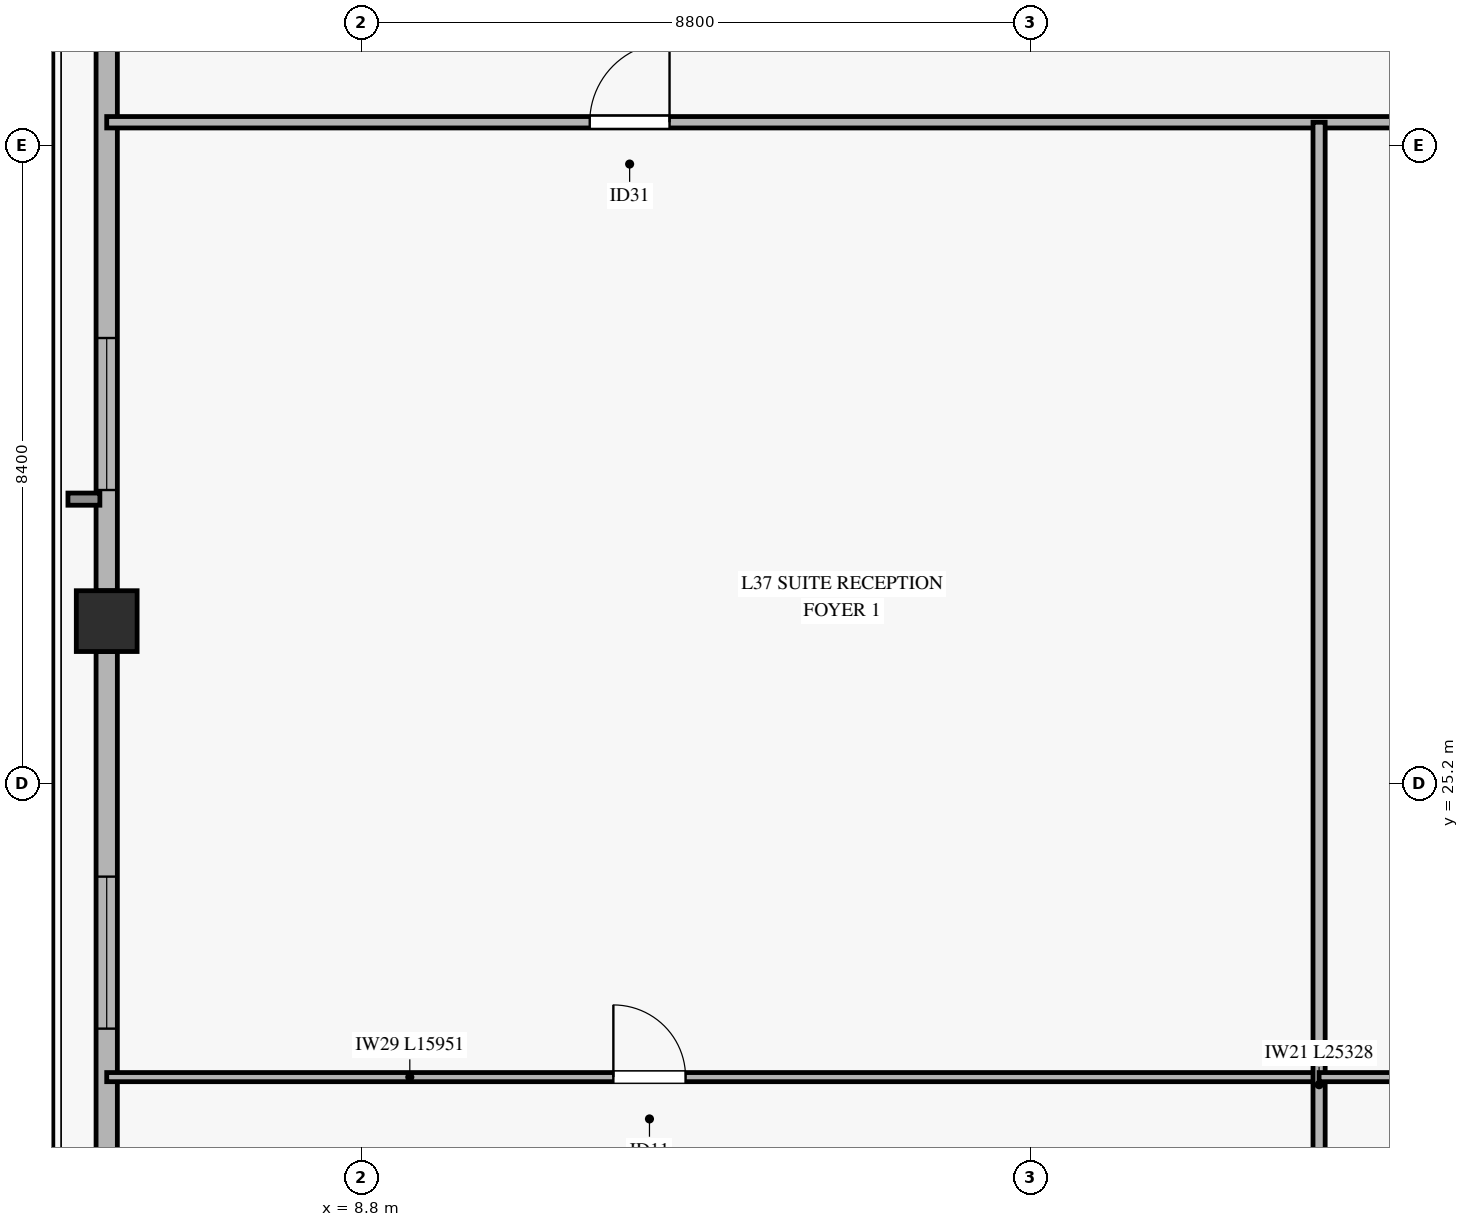
"""IFC4 building model, lengths in metres.
Left out: names, types, materials, properties, quantities, classifications, styles, units other than length and angle.
Written with IfcOpenShell. Run it as: python <this file> out.ifc"""

import sys

from ifc_helpers import new_model, si_unit, direction, frame, frame_2d, origin, origin_2d, place, context, subcontext, project, spatial, rectangle, hollow_rectangle, extrude, source, transform, mapped, element, fill, save


model = new_model("IFC4")
c1 = context("Model", 3, precision=1e-05, world=origin(), true_north=direction((0.0, 1.0)))
c2 = subcontext(c1, "Body", "Model", "MODEL_VIEW")
j1 = project(units=[si_unit("LENGTHUNIT", "METRE"), si_unit("PLANEANGLEUNIT", "RADIAN")], contexts=[c1])
p1 = place(None, origin())
s1 = spatial("IfcSite", under=j1, at=p1, CompositionType="ELEMENT")
p2 = place(p1, origin())
s2 = spatial("IfcBuilding", under=s1, at=p2, CompositionType="ELEMENT")
p3 = place(p2, frame((0.0, 0.0, 152.7)))
s3 = spatial("IfcBuildingStorey", under=s2, at=p3, CompositionType="ELEMENT", Elevation=152.7)
m1 = source(origin(), c2, "Body", "SweptSolid", [
    extrude(hollow_rectangle(XDim=0.8, YDim=0.8, WallThickness=0.036, at=origin_2d()), origin(), (0.0, 0.0, 1.0), 3.27),
])
p4 = place(p3, frame((5.449, 27.336, 0.0), z_axis=(0.0, 0.0, 1.0), x_axis=(1.0, 0.0, 0.0)))
e1 = element("IfcColumn", 1, at=p4, inside=s3, PredefinedType="COLUMN", context=c2, shape_type="MappedRepresentation", body=[
    mapped(m1, transform((0.0, 0.0, 0.0), x_axis=(1.0, 0.0, 0.0), y_axis=(0.0, 1.0, 0.0), z_axis=(0.0, 0.0, 1.0), scale=1.0)),
])
p5 = place(p3, frame((5.449, 11.511, 0.0), z_axis=(0.0, 0.0, 1.0), x_axis=(0.0, 1.0, 0.0)))
e2 = element("IfcWall", 2, at=p5, inside=s3, PredefinedType="SOLIDWALL", context=c2, shape_type="SweptSolid", body=[
    extrude(rectangle(XDim=15.425, YDim=0.28, at=frame_2d((7.712, 0.0))), origin(), (0.0, 0.0, 1.0), 2.75),
])
p6 = place(p5, frame((3.251, 0.0, 0.45)))
e3 = element("IfcOpeningElement", 3, at=p6, cuts=e2, PredefinedType="OPENING", context=c2, shape_type="SweptSolid", body=[
    extrude(rectangle(XDim=2.0, YDim=2.0, at=frame_2d((1.0, 1.0))), frame((0.0, 0.15, 0.0), z_axis=(0.0, -1.0, 0.0), x_axis=(1.0, 0.0, 0.0)), (0.0, 0.0, 1.0), 0.3),
])
p7 = place(p5, frame((10.463, 0.0, 0.45)))
e4 = element("IfcOpeningElement", 4, at=p7, cuts=e2, PredefinedType="OPENING", context=c2, shape_type="SweptSolid", body=[
    extrude(rectangle(XDim=2.0, YDim=2.0, at=frame_2d((1.0, 1.0))), frame((0.0, 0.15, 0.0), z_axis=(0.0, -1.0, 0.0), x_axis=(1.0, 0.0, 0.0)), (0.0, 0.0, 1.0), 0.3),
])
p8 = place(p3, frame((5.449, 27.736, 0.0), z_axis=(0.0, 0.0, 1.0), x_axis=(0.0, 1.0, 0.0)))
e5 = element("IfcWall", 5, at=p8, inside=s3, PredefinedType="SOLIDWALL", context=c2, shape_type="SweptSolid", body=[
    extrude(rectangle(XDim=15.425, YDim=0.28, at=frame_2d((7.712, 0.0))), origin(), (0.0, 0.0, 1.0), 2.75),
])
p9 = place(p8, frame((1.325, 0.0, 0.45)))
e6 = element("IfcOpeningElement", 6, at=p9, cuts=e5, PredefinedType="OPENING", context=c2, shape_type="SweptSolid", body=[
    extrude(rectangle(XDim=2.0, YDim=2.0, at=frame_2d((1.0, 1.0))), frame((0.0, 0.15, 0.0), z_axis=(0.0, -1.0, 0.0), x_axis=(1.0, 0.0, 0.0)), (0.0, 0.0, 1.0), 0.3),
])
p10 = place(p8, frame((12.031, 0.0, 0.45)))
e7 = element("IfcOpeningElement", 7, at=p10, cuts=e5, PredefinedType="OPENING", context=c2, shape_type="SweptSolid", body=[
    extrude(rectangle(XDim=2.0, YDim=2.0, at=frame_2d((1.0, 1.0))), frame((0.0, 0.15, 0.0), z_axis=(0.0, -1.0, 0.0), x_axis=(1.0, 0.0, 0.0)), (0.0, 0.0, 1.0), 0.3),
])
p11 = place(p3, frame((5.449, 33.9, 0.0), z_axis=(0.0, 0.0, 1.0), x_axis=(1.0, 0.0, 0.0)))
e8 = element("IfcWall", 8, at=p11, inside=s3, PredefinedType="PARTITIONING", context=c2, shape_type="SweptSolid", body=[
    extrude(rectangle(XDim=59.502, YDim=0.15, at=frame_2d((29.751, 0.0))), origin(), (0.0, 0.0, 1.0), 2.455),
])
p12 = place(p11, frame((6.355, 0.0, 0.0)))
e9 = element("IfcOpeningElement", 9, at=p12, cuts=e8, PredefinedType="OPENING", context=c2, shape_type="SweptSolid", body=[
    extrude(rectangle(XDim=1.05, YDim=2.15, at=frame_2d((0.525, 1.075))), frame((0.0, 0.085, 0.0), z_axis=(0.0, -1.0, 0.0), x_axis=(1.0, 0.0, 0.0)), (0.0, 0.0, 1.0), 0.17),
])
p13 = place(p11, frame((18.704, 0.0, 0.0)))
e10 = element("IfcOpeningElement", 10, at=p13, cuts=e8, PredefinedType="OPENING", context=c2, shape_type="SweptSolid", body=[
    extrude(rectangle(XDim=1.05, YDim=2.15, at=frame_2d((0.525, 1.075))), frame((0.0, 0.085, 0.0), z_axis=(0.0, -1.0, 0.0), x_axis=(1.0, 0.0, 0.0)), (0.0, 0.0, 1.0), 0.17),
])
p14 = place(p11, frame((24.896, 0.0, 0.0)))
e11 = element("IfcOpeningElement", 11, at=p14, cuts=e8, PredefinedType="OPENING", context=c2, shape_type="SweptSolid", body=[
    extrude(rectangle(XDim=1.05, YDim=2.15, at=frame_2d((0.525, 1.075))), frame((0.0, 0.085, 0.0), z_axis=(0.0, -1.0, 0.0), x_axis=(1.0, 0.0, 0.0)), (0.0, 0.0, 1.0), 0.17),
])
p15 = place(p11, frame((30.387, 0.0, 0.0)))
e12 = element("IfcOpeningElement", 12, at=p15, cuts=e8, PredefinedType="OPENING", context=c2, shape_type="SweptSolid", body=[
    extrude(rectangle(XDim=1.05, YDim=2.15, at=frame_2d((0.525, 1.075))), frame((0.0, 0.085, 0.0), z_axis=(0.0, -1.0, 0.0), x_axis=(1.0, 0.0, 0.0)), (0.0, 0.0, 1.0), 0.17),
])
p16 = place(p11, frame((35.587, 0.0, 0.0)))
e13 = element("IfcOpeningElement", 13, at=p16, cuts=e8, PredefinedType="OPENING", context=c2, shape_type="SweptSolid", body=[
    extrude(rectangle(XDim=1.05, YDim=2.15, at=frame_2d((0.525, 1.075))), frame((0.0, 0.085, 0.0), z_axis=(0.0, -1.0, 0.0), x_axis=(1.0, 0.0, 0.0)), (0.0, 0.0, 1.0), 0.17),
])
p17 = place(p11, frame((46.482, 0.0, 0.0)))
e14 = element("IfcOpeningElement", 14, at=p17, cuts=e8, PredefinedType="OPENING", context=c2, shape_type="SweptSolid", body=[
    extrude(rectangle(XDim=1.05, YDim=2.15, at=frame_2d((0.525, 1.075))), frame((0.0, 0.085, 0.0), z_axis=(0.0, -1.0, 0.0), x_axis=(1.0, 0.0, 0.0)), (0.0, 0.0, 1.0), 0.17),
])
p18 = place(p3, frame((5.449, 21.336, 0.0), z_axis=(0.0, 0.0, 1.0), x_axis=(1.0, 0.0, 0.0)))
e15 = element("IfcWall", 15, at=p18, inside=s3, PredefinedType="PARTITIONING", context=c2, shape_type="SweptSolid", body=[
    extrude(rectangle(XDim=15.951, YDim=0.12, at=frame_2d((7.976, 0.0))), origin(), (0.0, 0.0, 1.0), 2.455),
])
p19 = place(p18, frame((6.666, 0.0, 0.0)))
e16 = element("IfcOpeningElement", 16, at=p19, cuts=e15, PredefinedType="OPENING", context=c2, shape_type="SweptSolid", body=[
    extrude(rectangle(XDim=0.95, YDim=2.1, at=frame_2d((0.475, 1.05))), frame((0.0, 0.07, 0.0), z_axis=(0.0, -1.0, 0.0), x_axis=(1.0, 0.0, 0.0)), (0.0, 0.0, 1.0), 0.14),
])
p20 = place(p3, frame((21.4, 8.572, 0.0), z_axis=(0.0, 0.0, 1.0), x_axis=(0.0, 1.0, 0.0)))
e17 = element("IfcWall", 17, at=p20, inside=s3, PredefinedType="PARTITIONING", context=c2, shape_type="SweptSolid", body=[
    extrude(rectangle(XDim=25.328, YDim=0.16, at=frame_2d((12.664, 0.0))), origin(), (0.0, 0.0, 1.0), 2.755),
])
p21 = place(p3, frame((21.4, 21.336, 0.0), z_axis=(0.0, 0.0, 1.0), x_axis=(1.0, 0.0, 0.0)))
e18 = element("IfcWall", 18, at=p21, inside=s3, PredefinedType="PARTITIONING", context=c2, shape_type="SweptSolid", body=[
    extrude(rectangle(XDim=6.8, YDim=0.12, at=frame_2d((3.4, 0.0))), origin(), (0.0, 0.0, 1.0), 3.27),
])
p22 = place(p21, frame((2.886, 0.0, 0.0)))
e19 = element("IfcOpeningElement", 19, at=p22, cuts=e18, PredefinedType="OPENING", context=c2, shape_type="SweptSolid", body=[
    extrude(rectangle(XDim=0.95, YDim=2.1, at=frame_2d((0.475, 1.05))), frame((0.0, 0.07, 0.0), z_axis=(0.0, -1.0, 0.0), x_axis=(1.0, 0.0, 0.0)), (0.0, 0.0, 1.0), 0.14),
])
m2 = source(origin(), c2, "Body", "SweptSolid", [
    extrude(rectangle(XDim=2.0, YDim=2.0, at=frame_2d((1.0, 1.0))), frame((0.0, 0.03, 0.0), z_axis=(0.0, -1.0, 0.0), x_axis=(1.0, 0.0, 0.0)), (0.0, 0.0, 1.0), 0.06),
])
p23 = place(p7, origin())
e20 = element("IfcWindow", 20, at=p23, inside=s3, PartitioningType="SINGLE_PANEL", PredefinedType="WINDOW", context=c2, shape_type="MappedRepresentation", body=[
    mapped(m2, transform((0.0, 0.0, 0.0), x_axis=(1.0, 0.0, 0.0), y_axis=(0.0, 1.0, 0.0), z_axis=(0.0, 0.0, 1.0), scale=1.0)),
])
fill(e4, e20)
p24 = place(p9, origin())
e21 = element("IfcWindow", 21, at=p24, inside=s3, PartitioningType="SINGLE_PANEL", PredefinedType="WINDOW", context=c2, shape_type="MappedRepresentation", body=[
    mapped(m2, transform((0.0, 0.0, 0.0), x_axis=(1.0, 0.0, 0.0), y_axis=(0.0, 1.0, 0.0), z_axis=(0.0, 0.0, 1.0), scale=1.0)),
])
fill(e6, e21)
m3 = source(origin(), c2, "Body", "SweptSolid", [
    extrude(rectangle(XDim=1.05, YDim=2.15, at=frame_2d((0.525, 1.075))), frame((0.0, 0.025, 0.0), z_axis=(0.0, -1.0, 0.0), x_axis=(1.0, 0.0, 0.0)), (0.0, 0.0, 1.0), 0.05),
])
p25 = place(p12, origin())
e22 = element("IfcDoor", 22, at=p25, inside=s3, OperationType="SINGLE_SWING_RIGHT", PredefinedType="DOOR", context=c2, shape_type="MappedRepresentation", body=[
    mapped(m3, transform((0.0, 0.0, 0.0), x_axis=(1.0, 0.0, 0.0), y_axis=(0.0, 1.0, 0.0), z_axis=(0.0, 0.0, 1.0), scale=1.0)),
])
fill(e9, e22)
m4 = source(origin(), c2, "Body", "SweptSolid", [
    extrude(rectangle(XDim=0.95, YDim=2.1, at=frame_2d((0.475, 1.05))), frame((0.0, 0.025, 0.0), z_axis=(0.0, -1.0, 0.0), x_axis=(1.0, 0.0, 0.0)), (0.0, 0.0, 1.0), 0.05),
])
p26 = place(p19, origin())
e23 = element("IfcDoor", 23, at=p26, inside=s3, OperationType="SINGLE_SWING_LEFT", PredefinedType="DOOR", context=c2, shape_type="MappedRepresentation", body=[
    mapped(m4, transform((0.0, 0.0, 0.0), x_axis=(1.0, 0.0, 0.0), y_axis=(0.0, 1.0, 0.0), z_axis=(0.0, 0.0, 1.0), scale=1.0)),
])
fill(e16, e23)
save(model, sys.argv[1])
